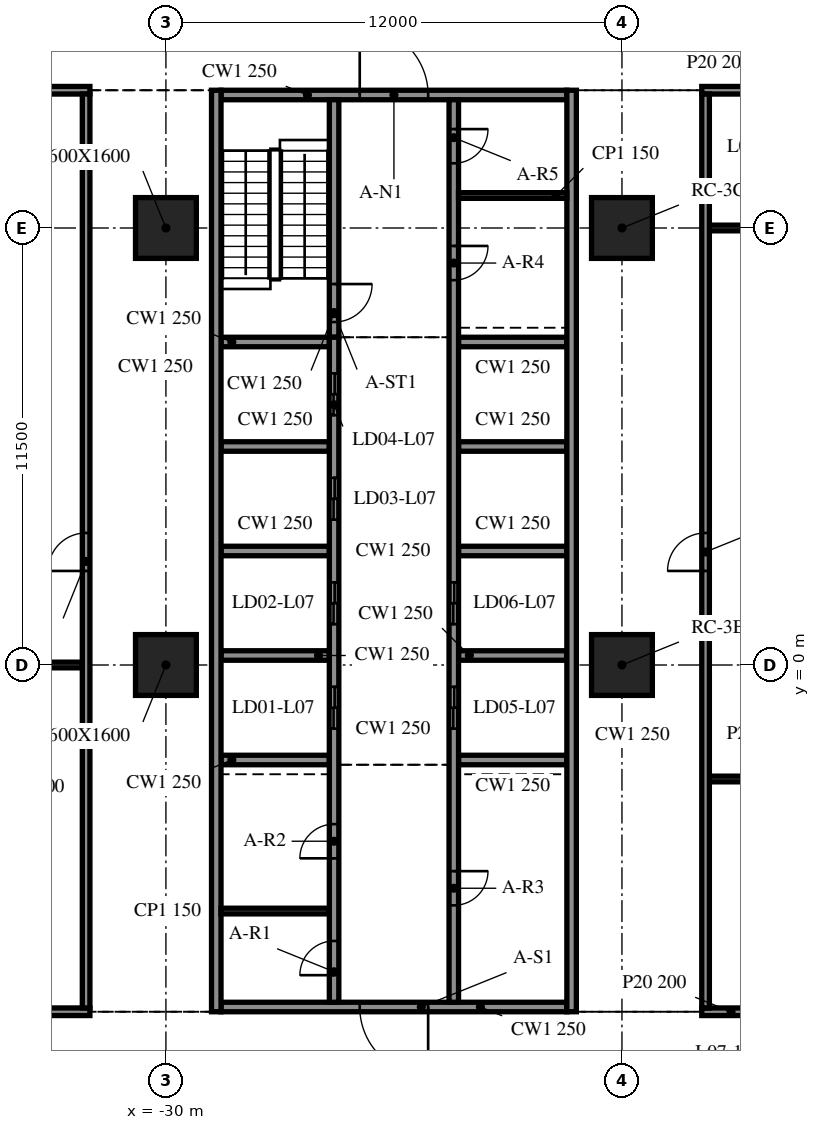
"""IFC4 building model, lengths in metres.
Left out: names, types, materials, properties, quantities, classifications, styles, units other than length and angle.
Written with IfcOpenShell. Run it as: python <this file> out.ifc"""

import sys

from ifc_helpers import new_model, si_unit, direction, frame, frame_2d, origin, origin_2d, place, context, subcontext, project, spatial, rectangle, extrude, element, fill, save


model = new_model("IFC4")
c1 = context("Model", 3, precision=1e-05, world=origin(), true_north=direction((0.0, 1.0)))
c2 = subcontext(c1, "Body", "Model", "MODEL_VIEW")
j1 = project(units=[si_unit("LENGTHUNIT", "METRE"), si_unit("PLANEANGLEUNIT", "RADIAN")], contexts=[c1])
p1 = place(None, origin())
s1 = spatial("IfcSite", under=j1, at=p1, CompositionType="ELEMENT")
p2 = place(p1, origin())
s2 = spatial("IfcBuilding", under=s1, at=p2, CompositionType="ELEMENT")
p3 = place(p2, frame((0.0, 0.0, 33.0)))
s3 = spatial("IfcBuildingStorey", under=s2, at=p3, CompositionType="ELEMENT", Elevation=33.0)
for number, where, z_axis, x_axis in (
    (1, (-30.0, 0.0, -0.34), (0.0, 0.0, 1.0), (1.0, 0.0, 0.0)),
    (2, (-30.0, 11.5, -0.34), (0.0, 0.0, 1.0), (1.0, 0.0, 0.0)),
    (3, (-18.0, 0.0, -0.34), (0.0, 0.0, 1.0), (1.0, 0.0, 0.0)),
    (4, (-18.0, 11.5, -0.34), (0.0, 0.0, 1.0), (1.0, 0.0, 0.0)),
):
    element("IfcColumn", number, at=place(p3, frame(where, z_axis=z_axis, x_axis=x_axis)), inside=s3, PredefinedType="COLUMN", context=c2, shape_type="SweptSolid", body=[
        extrude(rectangle(XDim=1.6, YDim=1.6, at=origin_2d()), origin(), (0.0, 0.0, 1.0), 4.3),
    ])
for number, where, z_axis, x_axis in (
    (5, (-28.675, 15.125, 0.0), (0.0, 0.0, 1.0), (0.0, -1.0, 0.0)),
    (6, (-19.325, -9.125, 0.0), (0.0, 0.0, 1.0), (0.0, 1.0, 0.0)),
):
    element("IfcWall", number, at=place(p3, frame(where, z_axis=z_axis, x_axis=x_axis)), inside=s3, PredefinedType="SOLIDWALL", context=c2, shape_type="SweptSolid", body=[
        extrude(rectangle(XDim=24.25, YDim=0.25, at=frame_2d((12.125, 0.0))), origin(), (0.0, 0.0, 1.0), 3.96),
    ])
p4 = place(p3, frame((-19.45, -9.0, 0.0), z_axis=(0.0, 0.0, 1.0), x_axis=(-1.0, 0.0, 0.0)))
e7 = element("IfcWall", 7, at=p4, inside=s3, PredefinedType="SOLIDWALL", context=c2, shape_type="SweptSolid", body=[
    extrude(rectangle(XDim=9.1, YDim=0.25, at=frame_2d((4.55, 0.0))), origin(), (0.0, 0.0, 1.0), 3.96),
])
p5 = place(p4, frame((3.65, 0.0, 0.0)))
e8 = element("IfcOpeningElement", 8, at=p5, cuts=e7, PredefinedType="OPENING", context=c2, shape_type="SweptSolid", body=[
    extrude(rectangle(XDim=1.8, YDim=2.1, at=frame_2d((0.9, 1.05))), frame((0.0, 0.135, 0.0), z_axis=(0.0, -1.0, 0.0), x_axis=(1.0, 0.0, 0.0)), (0.0, 0.0, 1.0), 0.27),
])
p6 = place(p3, frame((-28.55, 15.0, 0.0), z_axis=(0.0, 0.0, 1.0), x_axis=(1.0, 0.0, 0.0)))
e9 = element("IfcWall", 9, at=p6, inside=s3, PredefinedType="SOLIDWALL", context=c2, shape_type="SweptSolid", body=[
    extrude(rectangle(XDim=9.1, YDim=0.25, at=frame_2d((4.55, 0.0))), origin(), (0.0, 0.0, 1.0), 3.96),
])
p7 = place(p6, frame((3.65, 0.0, 0.0)))
e10 = element("IfcOpeningElement", 10, at=p7, cuts=e9, PredefinedType="OPENING", context=c2, shape_type="SweptSolid", body=[
    extrude(rectangle(XDim=1.8, YDim=2.1, at=frame_2d((0.9, 1.05))), frame((0.0, 0.135, 0.0), z_axis=(0.0, -1.0, 0.0), x_axis=(1.0, 0.0, 0.0)), (0.0, 0.0, 1.0), 0.27),
])
p8 = place(p3, frame((-25.575, -8.875, 0.0), z_axis=(0.0, 0.0, 1.0), x_axis=(0.0, 1.0, 0.0)))
e11 = element("IfcWall", 11, at=p8, inside=s3, PredefinedType="SOLIDWALL", context=c2, shape_type="SweptSolid", body=[
    extrude(rectangle(XDim=17.5, YDim=0.25, at=frame_2d((8.75, 0.0))), origin(), (0.0, 0.0, 1.0), 3.96),
])
p9 = place(p8, frame((7.2, 0.0, 0.0)))
e12 = element("IfcOpeningElement", 12, at=p9, cuts=e11, PredefinedType="OPENING", context=c2, shape_type="SweptSolid", body=[
    extrude(rectangle(XDim=1.1, YDim=2.1, at=frame_2d((0.55, 1.05))), frame((0.0, 0.135, 0.0), z_axis=(0.0, -1.0, 0.0), x_axis=(1.0, 0.0, 0.0)), (0.0, 0.0, 1.0), 0.27),
])
p10 = place(p8, frame((9.95, 0.0, 0.0)))
e13 = element("IfcOpeningElement", 13, at=p10, cuts=e11, PredefinedType="OPENING", context=c2, shape_type="SweptSolid", body=[
    extrude(rectangle(XDim=1.1, YDim=2.1, at=frame_2d((0.55, 1.05))), frame((0.0, 0.135, 0.0), z_axis=(0.0, -1.0, 0.0), x_axis=(1.0, 0.0, 0.0)), (0.0, 0.0, 1.0), 0.27),
])
p11 = place(p8, frame((12.7, 0.0, 0.0)))
e14 = element("IfcOpeningElement", 14, at=p11, cuts=e11, PredefinedType="OPENING", context=c2, shape_type="SweptSolid", body=[
    extrude(rectangle(XDim=1.1, YDim=2.1, at=frame_2d((0.55, 1.05))), frame((0.0, 0.135, 0.0), z_axis=(0.0, -1.0, 0.0), x_axis=(1.0, 0.0, 0.0)), (0.0, 0.0, 1.0), 0.27),
])
p12 = place(p8, frame((15.45, 0.0, 0.0)))
e15 = element("IfcOpeningElement", 15, at=p12, cuts=e11, PredefinedType="OPENING", context=c2, shape_type="SweptSolid", body=[
    extrude(rectangle(XDim=1.1, YDim=2.1, at=frame_2d((0.55, 1.05))), frame((0.0, 0.135, 0.0), z_axis=(0.0, -1.0, 0.0), x_axis=(1.0, 0.0, 0.0)), (0.0, 0.0, 1.0), 0.27),
])
p13 = place(p8, frame((0.712, 0.0, 0.0)))
e16 = element("IfcOpeningElement", 16, at=p13, cuts=e11, PredefinedType="OPENING", context=c2, shape_type="SweptSolid", body=[
    extrude(rectangle(XDim=0.9, YDim=2.1, at=frame_2d((0.45, 1.05))), frame((0.0, 0.135, 0.0), z_axis=(0.0, -1.0, 0.0), x_axis=(1.0, 0.0, 0.0)), (0.0, 0.0, 1.0), 0.27),
])
p14 = place(p8, frame((3.788, 0.0, 0.0)))
e17 = element("IfcOpeningElement", 17, at=p14, cuts=e11, PredefinedType="OPENING", context=c2, shape_type="SweptSolid", body=[
    extrude(rectangle(XDim=0.9, YDim=2.1, at=frame_2d((0.45, 1.05))), frame((0.0, 0.135, 0.0), z_axis=(0.0, -1.0, 0.0), x_axis=(1.0, 0.0, 0.0)), (0.0, 0.0, 1.0), 0.27),
])
p15 = place(p3, frame((-25.575, 14.875, 0.0), z_axis=(0.0, 0.0, 1.0), x_axis=(0.0, -1.0, 0.0)))
e18 = element("IfcWall", 18, at=p15, inside=s3, PredefinedType="SOLIDWALL", context=c2, shape_type="SweptSolid", body=[
    extrude(rectangle(XDim=6.25, YDim=0.25, at=frame_2d((3.125, 0.0))), origin(), (0.0, 0.0, 1.0), 3.96),
])
p16 = place(p15, frame((4.85, 0.0, 0.0)))
e19 = element("IfcOpeningElement", 19, at=p16, cuts=e18, PredefinedType="OPENING", context=c2, shape_type="SweptSolid", body=[
    extrude(rectangle(XDim=1.0, YDim=2.1, at=frame_2d((0.5, 1.05))), frame((0.0, 0.135, 0.0), z_axis=(0.0, -1.0, 0.0), x_axis=(1.0, 0.0, 0.0)), (0.0, 0.0, 1.0), 0.27),
])
p17 = place(p3, frame((-22.425, 14.875, 0.0), z_axis=(0.0, 0.0, 1.0), x_axis=(0.0, -1.0, 0.0)))
e20 = element("IfcWall", 20, at=p17, inside=s3, PredefinedType="SOLIDWALL", context=c2, shape_type="SweptSolid", body=[
    extrude(rectangle(XDim=23.75, YDim=0.25, at=frame_2d((11.875, 0.0))), origin(), (0.0, 0.0, 1.0), 3.96),
])
p18 = place(p17, frame((15.45, 0.0, 0.0)))
e21 = element("IfcOpeningElement", 21, at=p18, cuts=e20, PredefinedType="OPENING", context=c2, shape_type="SweptSolid", body=[
    extrude(rectangle(XDim=1.1, YDim=2.1, at=frame_2d((0.55, 1.05))), frame((0.0, 0.135, 0.0), z_axis=(0.0, -1.0, 0.0), x_axis=(1.0, 0.0, 0.0)), (0.0, 0.0, 1.0), 0.27),
])
p19 = place(p17, frame((12.7, 0.0, 0.0)))
e22 = element("IfcOpeningElement", 22, at=p19, cuts=e20, PredefinedType="OPENING", context=c2, shape_type="SweptSolid", body=[
    extrude(rectangle(XDim=1.1, YDim=2.1, at=frame_2d((0.55, 1.05))), frame((0.0, 0.135, 0.0), z_axis=(0.0, -1.0, 0.0), x_axis=(1.0, 0.0, 0.0)), (0.0, 0.0, 1.0), 0.27),
])
p20 = place(p17, frame((20.3, 0.0, 0.0)))
e23 = element("IfcOpeningElement", 23, at=p20, cuts=e20, PredefinedType="OPENING", context=c2, shape_type="SweptSolid", body=[
    extrude(rectangle(XDim=0.9, YDim=2.1, at=frame_2d((0.45, 1.05))), frame((0.0, 0.135, 0.0), z_axis=(0.0, -1.0, 0.0), x_axis=(1.0, 0.0, 0.0)), (0.0, 0.0, 1.0), 0.27),
])
p21 = place(p17, frame((3.847, 0.0, 0.0)))
e24 = element("IfcOpeningElement", 24, at=p21, cuts=e20, PredefinedType="OPENING", context=c2, shape_type="SweptSolid", body=[
    extrude(rectangle(XDim=0.9, YDim=2.1, at=frame_2d((0.45, 1.05))), frame((0.0, 0.135, 0.0), z_axis=(0.0, -1.0, 0.0), x_axis=(1.0, 0.0, 0.0)), (0.0, 0.0, 1.0), 0.27),
])
p22 = place(p17, frame((0.772, 0.0, 0.0)))
e25 = element("IfcOpeningElement", 25, at=p22, cuts=e20, PredefinedType="OPENING", context=c2, shape_type="SweptSolid", body=[
    extrude(rectangle(XDim=0.9, YDim=2.1, at=frame_2d((0.45, 1.05))), frame((0.0, 0.135, 0.0), z_axis=(0.0, -1.0, 0.0), x_axis=(1.0, 0.0, 0.0)), (0.0, 0.0, 1.0), 0.27),
])
for number, where, z_axis, x_axis in (
    (26, (-28.55, -2.5, 0.0), (0.0, 0.0, 1.0), (1.0, 0.0, 0.0)),
    (27, (-28.55, 0.25, 0.0), (0.0, 0.0, 1.0), (1.0, 0.0, 0.0)),
    (28, (-28.55, 3.0, 0.0), (0.0, 0.0, 1.0), (1.0, 0.0, 0.0)),
    (29, (-28.55, 5.75, 0.0), (0.0, 0.0, 1.0), (1.0, 0.0, 0.0)),
    (30, (-28.55, 8.5, 0.0), (0.0, 0.0, 1.0), (1.0, 0.0, 0.0)),
    (31, (-22.3, -2.5, 0.0), (0.0, 0.0, 1.0), (1.0, 0.0, 0.0)),
    (32, (-22.3, 0.25, 0.0), (0.0, 0.0, 1.0), (1.0, 0.0, 0.0)),
    (33, (-22.3, 3.0, 0.0), (0.0, 0.0, 1.0), (1.0, 0.0, 0.0)),
    (34, (-22.3, 5.75, 0.0), (0.0, 0.0, 1.0), (1.0, 0.0, 0.0)),
    (35, (-22.3, 8.5, 0.0), (0.0, 0.0, 1.0), (1.0, 0.0, 0.0)),
):
    element("IfcWall", number, at=place(p3, frame(where, z_axis=z_axis, x_axis=x_axis)), inside=s3, PredefinedType="SOLIDWALL", context=c2, shape_type="SweptSolid", body=[
        extrude(rectangle(XDim=2.85, YDim=0.25, at=frame_2d((1.425, 0.0))), origin(), (0.0, 0.0, 1.0), 3.96),
    ])
for number, where, z_axis, x_axis in (
    (36, (-28.55, -6.475, 0.0), (0.0, 0.0, 1.0), (1.0, 0.0, 0.0)),
    (37, (-22.3, 12.355, 0.0), (0.0, 0.0, 1.0), (1.0, 0.0, 0.0)),
):
    element("IfcWall", number, at=place(p3, frame(where, z_axis=z_axis, x_axis=x_axis)), inside=s3, PredefinedType="PARTITIONING", context=c2, shape_type="SweptSolid", body=[
        extrude(rectangle(XDim=2.85, YDim=0.15, at=frame_2d((1.425, 0.0))), origin(), (0.0, 0.0, 1.0), 3.96),
    ])
p23 = place(p3, frame((-45.95, -9.125, 0.0), z_axis=(0.0, 0.0, 1.0), x_axis=(1.0, 0.0, 0.0)))
e38 = element("IfcWall", 38, at=p23, inside=s3, PredefinedType="PARTITIONING", context=c2, shape_type="SweptSolid", body=[
    extrude(rectangle(XDim=13.95, YDim=0.2, at=frame_2d((6.975, 0.0))), origin(), (0.0, 0.0, 1.0), 3.96),
])
p24 = place(p23, frame((5.5, 0.0, 0.0)))
e39 = element("IfcOpeningElement", 39, at=p24, cuts=e38, PredefinedType="OPENING", context=c2, shape_type="SweptSolid", body=[
    extrude(rectangle(XDim=1.2, YDim=2.1, at=frame_2d((0.6, 1.05))), frame((0.0, 0.11, 0.0), z_axis=(0.0, -1.0, 0.0), x_axis=(1.0, 0.0, 0.0)), (0.0, 0.0, 1.0), 0.22),
])
p25 = place(p23, frame((7.3, 0.0, 0.0)))
e40 = element("IfcOpeningElement", 40, at=p25, cuts=e38, PredefinedType="OPENING", context=c2, shape_type="SweptSolid", body=[
    extrude(rectangle(XDim=1.2, YDim=2.1, at=frame_2d((0.6, 1.05))), frame((0.0, 0.11, 0.0), z_axis=(0.0, -1.0, 0.0), x_axis=(1.0, 0.0, 0.0)), (0.0, 0.0, 1.0), 0.22),
])
p26 = place(p3, frame((-15.9, -9.125, 0.0), z_axis=(0.0, 0.0, 1.0), x_axis=(1.0, 0.0, 0.0)))
e41 = element("IfcWall", 41, at=p26, inside=s3, PredefinedType="PARTITIONING", context=c2, shape_type="SweptSolid", body=[
    extrude(rectangle(XDim=7.7, YDim=0.2, at=frame_2d((3.85, 0.0))), origin(), (0.0, 0.0, 1.0), 3.96),
])
p27 = place(p26, frame((3.3, 0.0, 0.0)))
e42 = element("IfcOpeningElement", 42, at=p27, cuts=e41, PredefinedType="OPENING", context=c2, shape_type="SweptSolid", body=[
    extrude(rectangle(XDim=1.2, YDim=2.1, at=frame_2d((0.6, 1.05))), frame((0.0, 0.11, 0.0), z_axis=(0.0, -1.0, 0.0), x_axis=(1.0, 0.0, 0.0)), (0.0, 0.0, 1.0), 0.22),
])
p28 = place(p3, frame((-15.7, -3.0, 0.0), z_axis=(0.0, 0.0, 1.0), x_axis=(1.0, 0.0, 0.0)))
e43 = element("IfcWall", 43, at=p28, inside=s3, PredefinedType="PARTITIONING", context=c2, shape_type="SweptSolid", body=[
    extrude(rectangle(XDim=7.3, YDim=0.15, at=frame_2d((3.65, 0.0))), origin(), (0.0, 0.0, 1.0), 3.96),
])
p29 = place(p3, frame((-41.2, 0.0, 0.0), z_axis=(0.0, 0.0, 1.0), x_axis=(1.0, 0.0, 0.0)))
e44 = element("IfcWall", 44, at=p29, inside=s3, PredefinedType="PARTITIONING", context=c2, shape_type="SweptSolid", body=[
    extrude(rectangle(XDim=9.0, YDim=0.15, at=frame_2d((4.5, 0.0))), origin(), (0.0, 0.0, 1.0), 3.96),
])
p30 = place(p3, frame((-15.7, 11.5, 0.0), z_axis=(0.0, 0.0, 1.0), x_axis=(1.0, 0.0, 0.0)))
e45 = element("IfcWall", 45, at=p30, inside=s3, PredefinedType="PARTITIONING", context=c2, shape_type="SweptSolid", body=[
    extrude(rectangle(XDim=7.3, YDim=0.15, at=frame_2d((3.65, 0.0))), origin(), (0.0, 0.0, 1.0), 3.96),
])
p31 = place(p3, frame((-45.95, 15.125, 0.0), z_axis=(0.0, 0.0, 1.0), x_axis=(1.0, 0.0, 0.0)))
e46 = element("IfcWall", 46, at=p31, inside=s3, PredefinedType="PARTITIONING", context=c2, shape_type="SweptSolid", body=[
    extrude(rectangle(XDim=13.95, YDim=0.2, at=frame_2d((6.975, 0.0))), origin(), (0.0, 0.0, 1.0), 3.96),
])
p32 = place(p3, frame((-15.9, 15.125, 0.0), z_axis=(0.0, 0.0, 1.0), x_axis=(1.0, 0.0, 0.0)))
e47 = element("IfcWall", 47, at=p32, inside=s3, PredefinedType="PARTITIONING", context=c2, shape_type="SweptSolid", body=[
    extrude(rectangle(XDim=7.7, YDim=0.2, at=frame_2d((3.85, 0.0))), origin(), (0.0, 0.0, 1.0), 3.96),
])
p33 = place(p32, frame((3.3, 0.0, 0.0)))
e48 = element("IfcOpeningElement", 48, at=p33, cuts=e47, PredefinedType="OPENING", context=c2, shape_type="SweptSolid", body=[
    extrude(rectangle(XDim=1.0, YDim=2.1, at=frame_2d((0.5, 1.05))), frame((0.0, 0.11, 0.0), z_axis=(0.0, -1.0, 0.0), x_axis=(1.0, 0.0, 0.0)), (0.0, 0.0, 1.0), 0.22),
])
p34 = place(p3, frame((-32.1, -9.025, 0.0), z_axis=(0.0, 0.0, 1.0), x_axis=(0.0, 1.0, 0.0)))
e49 = element("IfcWall", 49, at=p34, inside=s3, PredefinedType="PARTITIONING", context=c2, shape_type="SweptSolid", body=[
    extrude(rectangle(XDim=24.05, YDim=0.2, at=frame_2d((12.025, 0.0))), origin(), (0.0, 0.0, 1.0), 3.96),
])
p35 = place(p34, frame((11.5, 0.0, 0.0)))
e50 = element("IfcOpeningElement", 50, at=p35, cuts=e49, PredefinedType="OPENING", context=c2, shape_type="SweptSolid", body=[
    extrude(rectangle(XDim=1.0, YDim=2.1, at=frame_2d((0.5, 1.05))), frame((0.0, 0.11, 0.0), z_axis=(0.0, -1.0, 0.0), x_axis=(1.0, 0.0, 0.0)), (0.0, 0.0, 1.0), 0.22),
])
p36 = place(p3, frame((-15.8, -9.025, 0.0), z_axis=(0.0, 0.0, 1.0), x_axis=(0.0, 1.0, 0.0)))
e51 = element("IfcWall", 51, at=p36, inside=s3, PredefinedType="PARTITIONING", context=c2, shape_type="SweptSolid", body=[
    extrude(rectangle(XDim=24.05, YDim=0.2, at=frame_2d((12.025, 0.0))), origin(), (0.0, 0.0, 1.0), 3.96),
])
p37 = place(p36, frame((11.5, 0.0, 0.0)))
e52 = element("IfcOpeningElement", 52, at=p37, cuts=e51, PredefinedType="OPENING", context=c2, shape_type="SweptSolid", body=[
    extrude(rectangle(XDim=1.0, YDim=2.1, at=frame_2d((0.5, 1.05))), frame((0.0, 0.11, 0.0), z_axis=(0.0, -1.0, 0.0), x_axis=(1.0, 0.0, 0.0)), (0.0, 0.0, 1.0), 0.22),
])
p38 = place(p5, origin())
e53 = element("IfcDoor", 53, at=p38, inside=s3, OperationType="DOUBLE_DOOR_SINGLE_SWING", PredefinedType="DOOR", context=c2, shape_type="SweptSolid", body=[
    extrude(rectangle(XDim=1.8, YDim=2.1, at=frame_2d((0.9, 1.05))), frame((0.0, 0.025, 0.0), z_axis=(0.0, -1.0, 0.0), x_axis=(1.0, 0.0, 0.0)), (0.0, 0.0, 1.0), 0.05),
])
fill(e8, e53)
p39 = place(p7, origin())
e54 = element("IfcDoor", 54, at=p39, inside=s3, OperationType="DOUBLE_DOOR_SINGLE_SWING", PredefinedType="DOOR", context=c2, shape_type="SweptSolid", body=[
    extrude(rectangle(XDim=1.8, YDim=2.1, at=frame_2d((0.9, 1.05))), frame((0.0, 0.025, 0.0), z_axis=(0.0, -1.0, 0.0), x_axis=(1.0, 0.0, 0.0)), (0.0, 0.0, 1.0), 0.05),
])
fill(e10, e54)
p40 = place(p18, origin())
e55 = element("IfcDoor", 55, at=p40, inside=s3, OperationType="DOUBLE_DOOR_SLIDING", PredefinedType="DOOR", context=c2, shape_type="SweptSolid", body=[
    extrude(rectangle(XDim=1.1, YDim=2.1, at=frame_2d((0.55, 1.05))), frame((0.0, 0.025, 0.0), z_axis=(0.0, -1.0, 0.0), x_axis=(1.0, 0.0, 0.0)), (0.0, 0.0, 1.0), 0.05),
])
fill(e21, e55)
p41 = place(p19, origin())
e56 = element("IfcDoor", 56, at=p41, inside=s3, OperationType="DOUBLE_DOOR_SLIDING", PredefinedType="DOOR", context=c2, shape_type="SweptSolid", body=[
    extrude(rectangle(XDim=1.1, YDim=2.1, at=frame_2d((0.55, 1.05))), frame((0.0, 0.025, 0.0), z_axis=(0.0, -1.0, 0.0), x_axis=(1.0, 0.0, 0.0)), (0.0, 0.0, 1.0), 0.05),
])
fill(e22, e56)
p42 = place(p9, origin())
e57 = element("IfcDoor", 57, at=p42, inside=s3, OperationType="DOUBLE_DOOR_SLIDING", PredefinedType="DOOR", context=c2, shape_type="SweptSolid", body=[
    extrude(rectangle(XDim=1.1, YDim=2.1, at=frame_2d((0.55, 1.05))), frame((0.0, 0.025, 0.0), z_axis=(0.0, -1.0, 0.0), x_axis=(1.0, 0.0, 0.0)), (0.0, 0.0, 1.0), 0.05),
])
fill(e12, e57)
p43 = place(p10, origin())
e58 = element("IfcDoor", 58, at=p43, inside=s3, OperationType="DOUBLE_DOOR_SLIDING", PredefinedType="DOOR", context=c2, shape_type="SweptSolid", body=[
    extrude(rectangle(XDim=1.1, YDim=2.1, at=frame_2d((0.55, 1.05))), frame((0.0, 0.025, 0.0), z_axis=(0.0, -1.0, 0.0), x_axis=(1.0, 0.0, 0.0)), (0.0, 0.0, 1.0), 0.05),
])
fill(e13, e58)
p44 = place(p11, origin())
e59 = element("IfcDoor", 59, at=p44, inside=s3, OperationType="DOUBLE_DOOR_SLIDING", PredefinedType="DOOR", context=c2, shape_type="SweptSolid", body=[
    extrude(rectangle(XDim=1.1, YDim=2.1, at=frame_2d((0.55, 1.05))), frame((0.0, 0.025, 0.0), z_axis=(0.0, -1.0, 0.0), x_axis=(1.0, 0.0, 0.0)), (0.0, 0.0, 1.0), 0.05),
])
fill(e14, e59)
p45 = place(p12, origin())
e60 = element("IfcDoor", 60, at=p45, inside=s3, OperationType="DOUBLE_DOOR_SLIDING", PredefinedType="DOOR", context=c2, shape_type="SweptSolid", body=[
    extrude(rectangle(XDim=1.1, YDim=2.1, at=frame_2d((0.55, 1.05))), frame((0.0, 0.025, 0.0), z_axis=(0.0, -1.0, 0.0), x_axis=(1.0, 0.0, 0.0)), (0.0, 0.0, 1.0), 0.05),
])
fill(e15, e60)
p46 = place(p13, origin())
e61 = element("IfcDoor", 61, at=p46, inside=s3, OperationType="SINGLE_SWING_LEFT", PredefinedType="DOOR", context=c2, shape_type="SweptSolid", body=[
    extrude(rectangle(XDim=0.9, YDim=2.1, at=frame_2d((0.45, 1.05))), frame((0.0, 0.025, 0.0), z_axis=(0.0, -1.0, 0.0), x_axis=(1.0, 0.0, 0.0)), (0.0, 0.0, 1.0), 0.05),
])
fill(e16, e61)
p47 = place(p14, origin())
e62 = element("IfcDoor", 62, at=p47, inside=s3, OperationType="SINGLE_SWING_RIGHT", PredefinedType="DOOR", context=c2, shape_type="SweptSolid", body=[
    extrude(rectangle(XDim=0.9, YDim=2.1, at=frame_2d((0.45, 1.05))), frame((0.0, 0.025, 0.0), z_axis=(0.0, -1.0, 0.0), x_axis=(1.0, 0.0, 0.0)), (0.0, 0.0, 1.0), 0.05),
])
fill(e17, e62)
p48 = place(p20, origin())
e63 = element("IfcDoor", 63, at=p48, inside=s3, OperationType="SINGLE_SWING_LEFT", PredefinedType="DOOR", context=c2, shape_type="SweptSolid", body=[
    extrude(rectangle(XDim=0.9, YDim=2.1, at=frame_2d((0.45, 1.05))), frame((0.0, 0.025, 0.0), z_axis=(0.0, -1.0, 0.0), x_axis=(1.0, 0.0, 0.0)), (0.0, 0.0, 1.0), 0.05),
])
fill(e23, e63)
p49 = place(p21, origin())
e64 = element("IfcDoor", 64, at=p49, inside=s3, OperationType="SINGLE_SWING_RIGHT", PredefinedType="DOOR", context=c2, shape_type="SweptSolid", body=[
    extrude(rectangle(XDim=0.9, YDim=2.1, at=frame_2d((0.45, 1.05))), frame((0.0, 0.025, 0.0), z_axis=(0.0, -1.0, 0.0), x_axis=(1.0, 0.0, 0.0)), (0.0, 0.0, 1.0), 0.05),
])
fill(e24, e64)
p50 = place(p22, origin())
e65 = element("IfcDoor", 65, at=p50, inside=s3, OperationType="SINGLE_SWING_LEFT", PredefinedType="DOOR", context=c2, shape_type="SweptSolid", body=[
    extrude(rectangle(XDim=0.9, YDim=2.1, at=frame_2d((0.45, 1.05))), frame((0.0, 0.025, 0.0), z_axis=(0.0, -1.0, 0.0), x_axis=(1.0, 0.0, 0.0)), (0.0, 0.0, 1.0), 0.05),
])
fill(e25, e65)
p51 = place(p16, origin())
e66 = element("IfcDoor", 66, at=p51, inside=s3, OperationType="SINGLE_SWING_RIGHT", PredefinedType="DOOR", context=c2, shape_type="SweptSolid", body=[
    extrude(rectangle(XDim=1.0, YDim=2.1, at=frame_2d((0.5, 1.05))), frame((0.0, 0.025, 0.0), z_axis=(0.0, -1.0, 0.0), x_axis=(1.0, 0.0, 0.0)), (0.0, 0.0, 1.0), 0.05),
])
fill(e19, e66)
p52 = place(p37, origin())
e67 = element("IfcDoor", 67, at=p52, inside=s3, OperationType="SINGLE_SWING_RIGHT", PredefinedType="DOOR", context=c2, shape_type="SweptSolid", body=[
    extrude(rectangle(XDim=1.0, YDim=2.1, at=frame_2d((0.5, 1.05))), frame((0.0, 0.025, 0.0), z_axis=(0.0, -1.0, 0.0), x_axis=(1.0, 0.0, 0.0)), (0.0, 0.0, 1.0), 0.05),
])
fill(e52, e67)
p53 = place(p35, origin())
e68 = element("IfcDoor", 68, at=p53, inside=s3, OperationType="SINGLE_SWING_LEFT", PredefinedType="DOOR", context=c2, shape_type="SweptSolid", body=[
    extrude(rectangle(XDim=1.0, YDim=2.1, at=frame_2d((0.5, 1.05))), frame((0.0, 0.025, 0.0), z_axis=(0.0, -1.0, 0.0), x_axis=(1.0, 0.0, 0.0)), (0.0, 0.0, 1.0), 0.05),
])
fill(e50, e68)
save(model, sys.argv[1])
